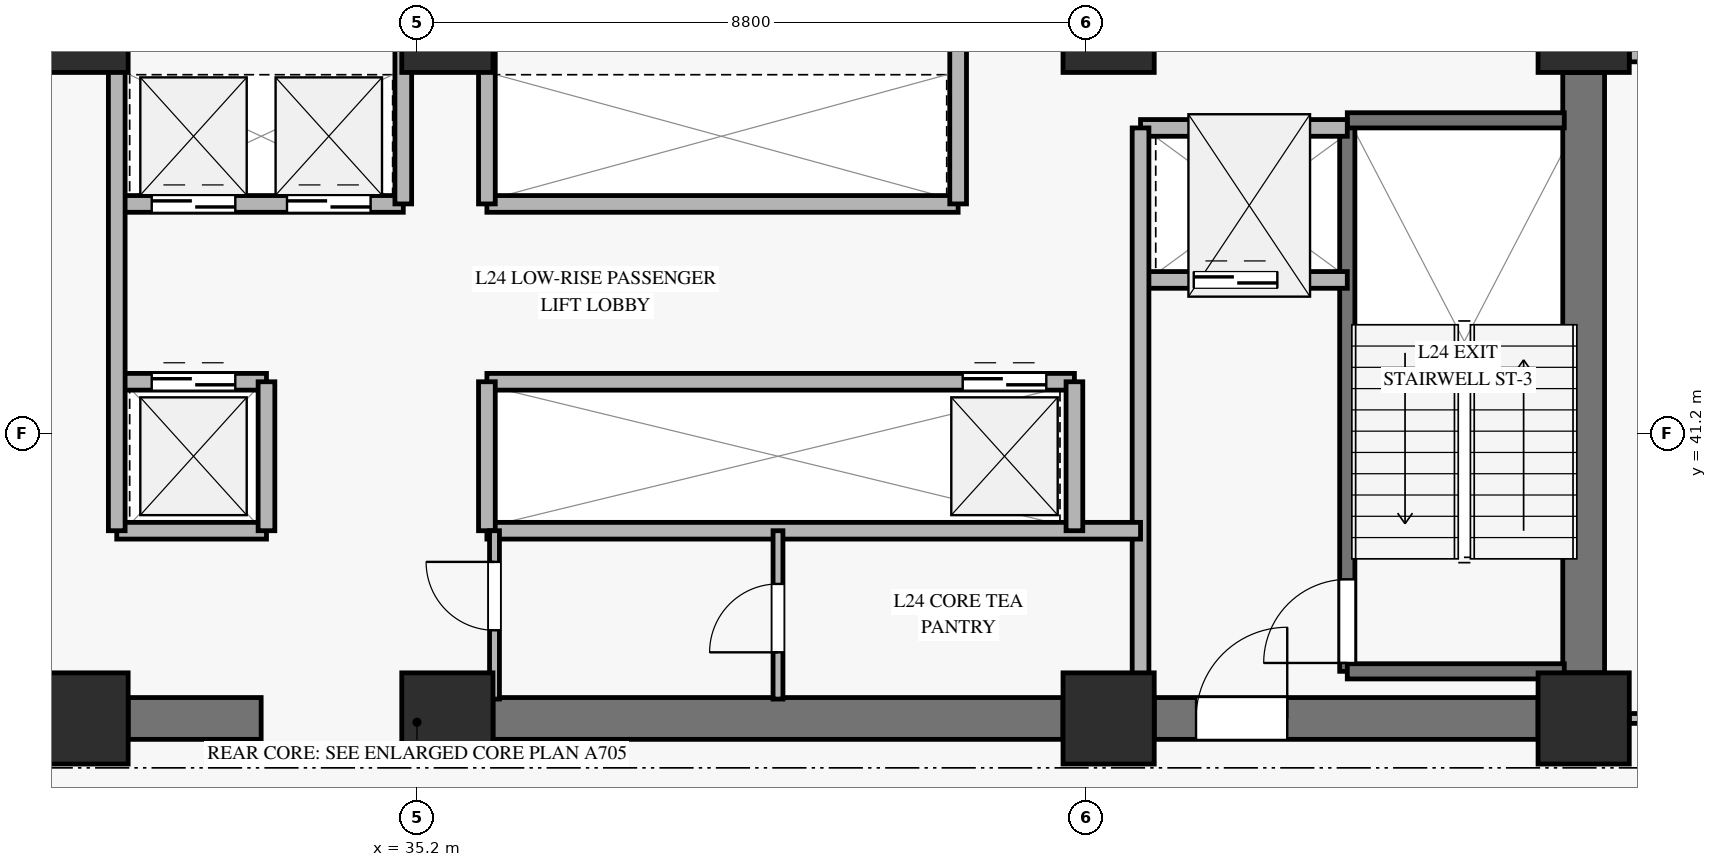
"""IFC4 building model, lengths in metres.
Left out: names, types, materials, properties, quantities, classifications, styles, units other than length and angle.
Written with IfcOpenShell. Run it as: python <this file> out.ifc"""

import sys

from ifc_helpers import new_model, si_unit, direction, frame, frame_2d, origin, origin_2d, place, context, subcontext, project, spatial, rectangle, extrude, source, transform, mapped, element, fill, save


model = new_model("IFC4")
c1 = context("Model", 3, precision=1e-05, world=origin(), true_north=direction((0.0, 1.0)))
c2 = subcontext(c1, "Body", "Model", "MODEL_VIEW")
j1 = project(units=[si_unit("LENGTHUNIT", "METRE"), si_unit("PLANEANGLEUNIT", "RADIAN")], contexts=[c1])
p1 = place(None, origin())
s1 = spatial("IfcSite", under=j1, at=p1, CompositionType="ELEMENT")
p2 = place(p1, origin())
s2 = spatial("IfcBuilding", under=s1, at=p2, CompositionType="ELEMENT")
p3 = place(p2, frame((0.0, 0.0, 99.7)))
s3 = spatial("IfcBuildingStorey", under=s2, at=p3, CompositionType="ELEMENT", Elevation=99.7)
m1 = source(origin(), c2, "Body", "SweptSolid", [
    extrude(rectangle(XDim=1.2, YDim=1.2, at=origin_2d()), origin(), (0.0, 0.0, 1.0), 3.68),
])
for number, where, z_axis, x_axis in (
    (1, (30.8, 37.45, 0.0), (0.0, 0.0, 1.0), (1.0, 0.0, 0.0)),
    (2, (30.8, 46.55, 0.0), (0.0, 0.0, 1.0), (1.0, 0.0, 0.0)),
    (3, (35.6, 37.45, 0.0), (0.0, 0.0, 1.0), (1.0, 0.0, 0.0)),
    (4, (35.6, 46.55, 0.0), (0.0, 0.0, 1.0), (1.0, 0.0, 0.0)),
    (5, (44.3, 37.45, 0.0), (0.0, 0.0, 1.0), (1.0, 0.0, 0.0)),
    (6, (44.3, 46.55, 0.0), (0.0, 0.0, 1.0), (1.0, 0.0, 0.0)),
    (7, (50.55, 37.45, 0.0), (0.0, 0.0, 1.0), (1.0, 0.0, 0.0)),
    (8, (50.55, 46.55, 0.0), (0.0, 0.0, 1.0), (1.0, 0.0, 0.0)),
):
    element("IfcColumn", number, at=place(p3, frame(where, z_axis=z_axis, x_axis=x_axis)), inside=s3, PredefinedType="PILASTER", context=c2, shape_type="MappedRepresentation", body=[
        mapped(m1, transform((0.0, 0.0, 0.0), x_axis=(1.0, 0.0, 0.0), y_axis=(0.0, 1.0, 0.0), z_axis=(0.0, 0.0, 1.0), scale=1.0)),
    ])
p4 = place(p3, frame((31.4, 37.45, 0.0), z_axis=(0.0, 0.0, 1.0), x_axis=(1.0, 0.0, 0.0)))
e9 = element("IfcWall", 9, at=p4, inside=s3, PredefinedType="SHEAR", context=c2, shape_type="SweptSolid", body=[
    extrude(rectangle(XDim=1.75, YDim=0.55, at=frame_2d((0.875, 0.0))), origin(), (0.0, 0.0, 1.0), 3.68),
])
p5 = place(p3, frame((36.2, 37.45, 0.0), z_axis=(0.0, 0.0, 1.0), x_axis=(1.0, 0.0, 0.0)))
e10 = element("IfcWall", 10, at=p5, inside=s3, PredefinedType="SHEAR", context=c2, shape_type="SweptSolid", body=[
    extrude(rectangle(XDim=7.5, YDim=0.55, at=frame_2d((3.75, 0.0))), origin(), (0.0, 0.0, 1.0), 3.68),
])
p6 = place(p3, frame((44.9, 37.45, 0.0), z_axis=(0.0, 0.0, 1.0), x_axis=(1.0, 0.0, 0.0)))
e11 = element("IfcWall", 11, at=p6, inside=s3, PredefinedType="SHEAR", context=c2, shape_type="SweptSolid", body=[
    extrude(rectangle(XDim=5.05, YDim=0.55, at=frame_2d((2.525, 0.0))), origin(), (0.0, 0.0, 1.0), 3.68),
])
p7 = place(p6, frame((0.55, 0.0, 0.0)))
e12 = element("IfcOpeningElement", 12, at=p7, cuts=e11, PredefinedType="OPENING", context=c2, shape_type="SweptSolid", body=[
    extrude(rectangle(XDim=1.2, YDim=2.15, at=frame_2d((0.6, 1.075))), frame((0.0, 0.285, 0.0), z_axis=(0.0, -1.0, 0.0), x_axis=(1.0, 0.0, 0.0)), (0.0, 0.0, 1.0), 0.57),
])
p8 = place(p3, frame((50.55, 38.05, 0.0), z_axis=(0.0, 0.0, 1.0), x_axis=(0.0, 1.0, 0.0)))
e13 = element("IfcWall", 13, at=p8, inside=s3, PredefinedType="SHEAR", context=c2, shape_type="SweptSolid", body=[
    extrude(rectangle(XDim=7.9, YDim=0.55, at=frame_2d((3.95, 0.0))), origin(), (0.0, 0.0, 1.0), 3.68),
])
p9 = place(p3, frame((51.15, 46.25, 0.0), z_axis=(0.0, 0.0, 1.0), x_axis=(1.0, 0.0, 0.0)))
e14 = element("IfcWall", 14, at=p9, inside=s3, PredefinedType="SOLIDWALL", context=c2, shape_type="SweptSolid", body=[
    extrude(rectangle(XDim=11.248, YDim=0.32, at=frame_2d((5.624, 0.0))), origin(), (0.0, 0.0, 1.0), 3.16),
])
p10 = place(p9, frame((4.824, 0.0, 0.45)))
e15 = element("IfcOpeningElement", 15, at=p10, cuts=e14, PredefinedType="OPENING", context=c2, shape_type="SweptSolid", body=[
    extrude(rectangle(XDim=1.6, YDim=2.0, at=frame_2d((0.8, 1.0))), frame((0.0, 0.17, 0.0), z_axis=(0.0, -1.0, 0.0), x_axis=(1.0, 0.0, 0.0)), (0.0, 0.0, 1.0), 0.34),
])
p11 = place(p3, frame((47.44, 38.07, 0.0), z_axis=(0.0, 0.0, 1.0), x_axis=(0.0, 1.0, 0.0)))
e16 = element("IfcWall", 16, at=p11, inside=s3, PredefinedType="SOLIDWALL", context=c2, shape_type="SweptSolid", body=[
    extrude(rectangle(XDim=7.25, YDim=0.2, at=frame_2d((3.625, 0.0))), origin(), (0.0, 0.0, 1.0), 3.9),
])
p12 = place(p11, frame((0.11, 0.0, 0.0)))
e17 = element("IfcOpeningElement", 17, at=p12, cuts=e16, PredefinedType="OPENING", context=c2, shape_type="SweptSolid", body=[
    extrude(rectangle(XDim=1.1, YDim=2.15, at=frame_2d((0.55, 1.075))), frame((0.0, 0.11, 0.0), z_axis=(0.0, -1.0, 0.0), x_axis=(1.0, 0.0, 0.0)), (0.0, 0.0, 1.0), 0.22),
])
for number, where, z_axis, x_axis in (
    (18, (47.44, 45.32, 0.0), (0.0, 0.0, 1.0), (1.0, 0.0, 0.0)),
    (19, (47.44, 38.07, 0.0), (0.0, 0.0, 1.0), (1.0, 0.0, 0.0)),
):
    element("IfcWall", number, at=place(p3, frame(where, z_axis=z_axis, x_axis=x_axis)), inside=s3, PredefinedType="SOLIDWALL", context=c2, shape_type="SweptSolid", body=[
        extrude(rectangle(XDim=2.855, YDim=0.2, at=frame_2d((1.427, 0.0))), origin(), (0.0, 0.0, 1.0), 3.9),
    ])
p13 = place(p3, frame((44.72, 43.22, 0.0), z_axis=(0.0, 0.0, 1.0), x_axis=(1.0, 0.0, 0.0)))
e20 = element("IfcWall", 20, at=p13, inside=s3, PredefinedType="SOLIDWALL", context=c2, shape_type="SweptSolid", body=[
    extrude(rectangle(XDim=2.72, YDim=0.22, at=frame_2d((1.36, 0.0))), origin(), (0.0, 0.0, 1.0), 3.68),
])
p14 = place(p13, frame((0.7, 0.0, 0.0)))
e21 = element("IfcOpeningElement", 21, at=p14, cuts=e20, PredefinedType="OPENING", context=c2, shape_type="SweptSolid", body=[
    extrude(rectangle(XDim=1.1, YDim=2.2, at=frame_2d((0.55, 1.1))), frame((0.0, 0.12, 0.0), z_axis=(0.0, -1.0, 0.0), x_axis=(1.0, 0.0, 0.0)), (0.0, 0.0, 1.0), 0.24),
])
p15 = place(p3, frame((44.72, 45.22, 0.0), z_axis=(0.0, 0.0, 1.0), x_axis=(1.0, 0.0, 0.0)))
e22 = element("IfcWall", 22, at=p15, inside=s3, PredefinedType="SOLIDWALL", context=c2, shape_type="SweptSolid", body=[
    extrude(rectangle(XDim=2.72, YDim=0.22, at=frame_2d((1.36, 0.0))), origin(), (0.0, 0.0, 1.0), 3.68),
])
p16 = place(p3, frame((44.72, 37.705, 0.0), z_axis=(0.0, 0.0, 1.0), x_axis=(0.0, 1.0, 0.0)))
e23 = element("IfcWall", 23, at=p16, inside=s3, PredefinedType="SOLIDWALL", context=c2, shape_type="SweptSolid", body=[
    extrude(rectangle(XDim=7.515, YDim=0.22, at=frame_2d((3.757, 0.0))), origin(), (0.0, 0.0, 1.0), 3.68),
])
p17 = place(p3, frame((31.25, 44.22, 0.0), z_axis=(0.0, 0.0, 1.0), x_axis=(1.0, 0.0, 0.0)))
e24 = element("IfcWall", 24, at=p17, inside=s3, PredefinedType="SOLIDWALL", context=c2, shape_type="SweptSolid", body=[
    extrude(rectangle(XDim=3.77, YDim=0.22, at=frame_2d((1.885, 0.0))), origin(), (0.0, 0.0, 1.0), 3.68),
])
p18 = place(p17, frame((0.46, 0.0, 0.0)))
e25 = element("IfcOpeningElement", 25, at=p18, cuts=e24, PredefinedType="OPENING", context=c2, shape_type="SweptSolid", body=[
    extrude(rectangle(XDim=1.1, YDim=2.2, at=frame_2d((0.55, 1.1))), frame((0.0, 0.12, 0.0), z_axis=(0.0, -1.0, 0.0), x_axis=(1.0, 0.0, 0.0)), (0.0, 0.0, 1.0), 0.24),
])
p19 = place(p17, frame((2.24, 0.0, 0.0)))
e26 = element("IfcOpeningElement", 26, at=p19, cuts=e24, PredefinedType="OPENING", context=c2, shape_type="SweptSolid", body=[
    extrude(rectangle(XDim=1.1, YDim=2.2, at=frame_2d((0.55, 1.1))), frame((0.0, 0.12, 0.0), z_axis=(0.0, -1.0, 0.0), x_axis=(1.0, 0.0, 0.0)), (0.0, 0.0, 1.0), 0.24),
])
p20 = place(p3, frame((36.12, 44.22, 0.0), z_axis=(0.0, 0.0, 1.0), x_axis=(1.0, 0.0, 0.0)))
e27 = element("IfcWall", 27, at=p20, inside=s3, PredefinedType="SOLIDWALL", context=c2, shape_type="SweptSolid", body=[
    extrude(rectangle(XDim=6.2, YDim=0.22, at=frame_2d((3.1, 0.0))), origin(), (0.0, 0.0, 1.0), 3.68),
])
for number, where, z_axis, x_axis in (
    (28, (35.02, 44.22, 0.0), (0.0, 0.0, 1.0), (0.0, 1.0, 0.0)),
    (29, (36.12, 44.22, 0.0), (0.0, 0.0, 1.0), (0.0, 1.0, 0.0)),
    (30, (42.32, 44.22, 0.0), (0.0, 0.0, 1.0), (0.0, 1.0, 0.0)),
):
    element("IfcWall", number, at=place(p3, frame(where, z_axis=z_axis, x_axis=x_axis)), inside=s3, PredefinedType="SOLIDWALL", context=c2, shape_type="SweptSolid", body=[
        extrude(rectangle(XDim=2.075, YDim=0.22, at=frame_2d((1.038, 0.0))), origin(), (0.0, 0.0, 1.0), 3.68),
    ])
p21 = place(p3, frame((31.25, 41.88, 0.0), z_axis=(0.0, 0.0, 1.0), x_axis=(1.0, 0.0, 0.0)))
e31 = element("IfcWall", 31, at=p21, inside=s3, PredefinedType="SOLIDWALL", context=c2, shape_type="SweptSolid", body=[
    extrude(rectangle(XDim=1.97, YDim=0.22, at=frame_2d((0.985, 0.0))), origin(), (0.0, 0.0, 1.0), 3.68),
])
p22 = place(p21, frame((0.46, 0.0, 0.0)))
e32 = element("IfcOpeningElement", 32, at=p22, cuts=e31, PredefinedType="OPENING", context=c2, shape_type="SweptSolid", body=[
    extrude(rectangle(XDim=1.1, YDim=2.2, at=frame_2d((0.55, 1.1))), frame((0.0, 0.12, 0.0), z_axis=(0.0, -1.0, 0.0), x_axis=(1.0, 0.0, 0.0)), (0.0, 0.0, 1.0), 0.24),
])
p23 = place(p3, frame((36.12, 41.88, 0.0), z_axis=(0.0, 0.0, 1.0), x_axis=(1.0, 0.0, 0.0)))
e33 = element("IfcWall", 33, at=p23, inside=s3, PredefinedType="SOLIDWALL", context=c2, shape_type="SweptSolid", body=[
    extrude(rectangle(XDim=7.73, YDim=0.22, at=frame_2d((3.865, 0.0))), origin(), (0.0, 0.0, 1.0), 3.68),
])
p24 = place(p23, frame((6.26, 0.0, 0.0)))
e34 = element("IfcOpeningElement", 34, at=p24, cuts=e33, PredefinedType="OPENING", context=c2, shape_type="SweptSolid", body=[
    extrude(rectangle(XDim=1.1, YDim=2.2, at=frame_2d((0.55, 1.1))), frame((0.0, 0.12, 0.0), z_axis=(0.0, -1.0, 0.0), x_axis=(1.0, 0.0, 0.0)), (0.0, 0.0, 1.0), 0.24),
])
p25 = place(p3, frame((31.25, 39.92, 0.0), z_axis=(0.0, 0.0, 1.0), x_axis=(1.0, 0.0, 0.0)))
e35 = element("IfcWall", 35, at=p25, inside=s3, PredefinedType="SOLIDWALL", context=c2, shape_type="SweptSolid", body=[
    extrude(rectangle(XDim=1.97, YDim=0.22, at=frame_2d((0.985, 0.0))), origin(), (0.0, 0.0, 1.0), 3.68),
])
p26 = place(p3, frame((33.22, 39.92, 0.0), z_axis=(0.0, 0.0, 1.0), x_axis=(0.0, 1.0, 0.0)))
e36 = element("IfcWall", 36, at=p26, inside=s3, PredefinedType="SOLIDWALL", context=c2, shape_type="SweptSolid", body=[
    extrude(rectangle(XDim=1.96, YDim=0.22, at=frame_2d((0.98, 0.0))), origin(), (0.0, 0.0, 1.0), 3.68),
])
p27 = place(p3, frame((36.12, 39.92, 0.0), z_axis=(0.0, 0.0, 1.0), x_axis=(1.0, 0.0, 0.0)))
e37 = element("IfcWall", 37, at=p27, inside=s3, PredefinedType="SOLIDWALL", context=c2, shape_type="SweptSolid", body=[
    extrude(rectangle(XDim=8.6, YDim=0.22, at=frame_2d((4.3, 0.0))), origin(), (0.0, 0.0, 1.0), 2.965),
])
p28 = place(p3, frame((36.12, 39.92, 0.0), z_axis=(0.0, 0.0, 1.0), x_axis=(0.0, 1.0, 0.0)))
e38 = element("IfcWall", 38, at=p28, inside=s3, PredefinedType="SOLIDWALL", context=c2, shape_type="SweptSolid", body=[
    extrude(rectangle(XDim=1.96, YDim=0.22, at=frame_2d((0.98, 0.0))), origin(), (0.0, 0.0, 1.0), 3.68),
])
p29 = place(p3, frame((31.25, 39.92, 0.0), z_axis=(0.0, 0.0, 1.0), x_axis=(0.0, 1.0, 0.0)))
e39 = element("IfcWall", 39, at=p29, inside=s3, PredefinedType="SOLIDWALL", context=c2, shape_type="SweptSolid", body=[
    extrude(rectangle(XDim=6.375, YDim=0.22, at=frame_2d((3.188, 0.0))), origin(), (0.0, 0.0, 1.0), 3.68),
])
p30 = place(p3, frame((43.85, 39.92, 0.0), z_axis=(0.0, 0.0, 1.0), x_axis=(0.0, 1.0, 0.0)))
e40 = element("IfcWall", 40, at=p30, inside=s3, PredefinedType="SOLIDWALL", context=c2, shape_type="SweptSolid", body=[
    extrude(rectangle(XDim=1.96, YDim=0.22, at=frame_2d((0.98, 0.0))), origin(), (0.0, 0.0, 1.0), 3.68),
])
p31 = place(p3, frame((36.22, 37.705, 0.0), z_axis=(0.0, 0.0, 1.0), x_axis=(0.0, 1.0, 0.0)))
e41 = element("IfcWall", 41, at=p31, inside=s3, PredefinedType="PARTITIONING", context=c2, shape_type="SweptSolid", body=[
    extrude(rectangle(XDim=2.215, YDim=0.13, at=frame_2d((1.107, 0.0))), origin(), (0.0, 0.0, 1.0), 3.68),
])
p32 = place(p31, frame((0.905, 0.0, 0.0)))
e42 = element("IfcOpeningElement", 42, at=p32, cuts=e41, PredefinedType="OPENING", context=c2, shape_type="SweptSolid", body=[
    extrude(rectangle(XDim=0.9, YDim=2.1, at=frame_2d((0.45, 1.05))), frame((0.0, 0.075, 0.0), z_axis=(0.0, -1.0, 0.0), x_axis=(1.0, 0.0, 0.0)), (0.0, 0.0, 1.0), 0.15),
])
p33 = place(p3, frame((39.95, 37.705, 0.0), z_axis=(0.0, 0.0, 1.0), x_axis=(0.0, 1.0, 0.0)))
e43 = element("IfcWall", 43, at=p33, inside=s3, PredefinedType="PARTITIONING", context=c2, shape_type="SweptSolid", body=[
    extrude(rectangle(XDim=2.215, YDim=0.13, at=frame_2d((1.107, 0.0))), origin(), (0.0, 0.0, 1.0), 3.68),
])
p34 = place(p33, frame((0.615, 0.0, 0.0)))
e44 = element("IfcOpeningElement", 44, at=p34, cuts=e43, PredefinedType="OPENING", context=c2, shape_type="SweptSolid", body=[
    extrude(rectangle(XDim=0.9, YDim=2.1, at=frame_2d((0.45, 1.05))), frame((0.0, 0.075, 0.0), z_axis=(0.0, -1.0, 0.0), x_axis=(1.0, 0.0, 0.0)), (0.0, 0.0, 1.0), 0.15),
])
p35 = place(p3, frame((51.15, 37.45, 0.0), z_axis=(0.0, 0.0, 1.0), x_axis=(1.0, 0.0, 0.0)))
e45 = element("IfcWall", 45, at=p35, inside=s3, PredefinedType="PARTITIONING", context=c2, shape_type="SweptSolid", body=[
    extrude(rectangle(XDim=14.741, YDim=0.13, at=frame_2d((7.371, 0.0))), origin(), (0.0, 0.0, 1.0), 3.165),
])
p36 = place(p35, frame((0.5, 0.0, 0.0)))
e46 = element("IfcOpeningElement", 46, at=p36, cuts=e45, PredefinedType="OPENING", context=c2, shape_type="SweptSolid", body=[
    extrude(rectangle(XDim=0.9, YDim=2.1, at=frame_2d((0.45, 1.05))), frame((0.0, 0.075, 0.0), z_axis=(0.0, -1.0, 0.0), x_axis=(1.0, 0.0, 0.0)), (0.0, 0.0, 1.0), 0.15),
])
p37 = place(p35, frame((10.759, 0.0, 0.0)))
e47 = element("IfcOpeningElement", 47, at=p37, cuts=e45, PredefinedType="OPENING", context=c2, shape_type="SweptSolid", body=[
    extrude(rectangle(XDim=0.95, YDim=2.1, at=frame_2d((0.475, 1.05))), frame((0.0, 0.075, 0.0), z_axis=(0.0, -1.0, 0.0), x_axis=(1.0, 0.0, 0.0)), (0.0, 0.0, 1.0), 0.15),
])
m2 = source(origin(), c2, "Body", "SweptSolid", [
    extrude(rectangle(XDim=1.1, YDim=2.15, at=frame_2d((0.55, 1.075))), frame((0.0, 0.025, 0.0), z_axis=(0.0, -1.0, 0.0), x_axis=(1.0, 0.0, 0.0)), (0.0, 0.0, 1.0), 0.05),
])
p38 = place(p12, origin())
e48 = element("IfcDoor", 48, at=p38, inside=s3, OperationType="SINGLE_SWING_LEFT", PredefinedType="DOOR", context=c2, shape_type="MappedRepresentation", body=[
    mapped(m2, transform((0.0, 0.0, 0.0), x_axis=(1.0, 0.0, 0.0), y_axis=(0.0, 1.0, 0.0), z_axis=(0.0, 0.0, 1.0), scale=1.0)),
])
fill(e17, e48)
m3 = source(origin(), c2, "Body", "SweptSolid", [
    extrude(rectangle(XDim=1.1, YDim=2.2, at=frame_2d((0.55, 1.1))), frame((0.0, 0.025, 0.0), z_axis=(0.0, -1.0, 0.0), x_axis=(1.0, 0.0, 0.0)), (0.0, 0.0, 1.0), 0.05),
])
p39 = place(p14, origin())
e49 = element("IfcDoor", 49, at=p39, inside=s3, OperationType="SLIDING_TO_LEFT", PredefinedType="DOOR", context=c2, shape_type="MappedRepresentation", body=[
    mapped(m3, transform((0.0, 0.0, 0.0), x_axis=(1.0, 0.0, 0.0), y_axis=(0.0, 1.0, 0.0), z_axis=(0.0, 0.0, 1.0), scale=1.0)),
])
fill(e21, e49)
m4 = source(origin(), c2, "Body", "SweptSolid", [
    extrude(rectangle(XDim=1.2, YDim=2.15, at=frame_2d((0.6, 1.075))), frame((0.0, 0.025, 0.0), z_axis=(0.0, -1.0, 0.0), x_axis=(1.0, 0.0, 0.0)), (0.0, 0.0, 1.0), 0.05),
])
p40 = place(p7, origin())
e50 = element("IfcDoor", 50, at=p40, inside=s3, OperationType="SINGLE_SWING_RIGHT", PredefinedType="DOOR", context=c2, shape_type="MappedRepresentation", body=[
    mapped(m4, transform((0.0, 0.0, 0.0), x_axis=(1.0, 0.0, 0.0), y_axis=(0.0, 1.0, 0.0), z_axis=(0.0, 0.0, 1.0), scale=1.0)),
])
fill(e12, e50)
p41 = place(p18, origin())
e51 = element("IfcDoor", 51, at=p41, inside=s3, OperationType="SLIDING_TO_LEFT", PredefinedType="DOOR", context=c2, shape_type="MappedRepresentation", body=[
    mapped(m3, transform((0.0, 0.0, 0.0), x_axis=(1.0, 0.0, 0.0), y_axis=(0.0, 1.0, 0.0), z_axis=(0.0, 0.0, 1.0), scale=1.0)),
])
fill(e25, e51)
p42 = place(p19, origin())
e52 = element("IfcDoor", 52, at=p42, inside=s3, OperationType="SLIDING_TO_LEFT", PredefinedType="DOOR", context=c2, shape_type="MappedRepresentation", body=[
    mapped(m3, transform((0.0, 0.0, 0.0), x_axis=(1.0, 0.0, 0.0), y_axis=(0.0, 1.0, 0.0), z_axis=(0.0, 0.0, 1.0), scale=1.0)),
])
fill(e26, e52)
p43 = place(p22, origin())
e53 = element("IfcDoor", 53, at=p43, inside=s3, OperationType="SLIDING_TO_LEFT", PredefinedType="DOOR", context=c2, shape_type="MappedRepresentation", body=[
    mapped(m3, transform((0.0, 0.0, 0.0), x_axis=(1.0, 0.0, 0.0), y_axis=(0.0, 1.0, 0.0), z_axis=(0.0, 0.0, 1.0), scale=1.0)),
])
fill(e32, e53)
p44 = place(p24, origin())
e54 = element("IfcDoor", 54, at=p44, inside=s3, OperationType="SLIDING_TO_LEFT", PredefinedType="DOOR", context=c2, shape_type="MappedRepresentation", body=[
    mapped(m3, transform((0.0, 0.0, 0.0), x_axis=(1.0, 0.0, 0.0), y_axis=(0.0, 1.0, 0.0), z_axis=(0.0, 0.0, 1.0), scale=1.0)),
])
fill(e34, e54)
m5 = source(origin(), c2, "Body", "SweptSolid", [
    extrude(rectangle(XDim=0.9, YDim=2.1, at=frame_2d((0.45, 1.05))), frame((0.0, 0.025, 0.0), z_axis=(0.0, -1.0, 0.0), x_axis=(1.0, 0.0, 0.0)), (0.0, 0.0, 1.0), 0.05),
])
p45 = place(p32, origin())
e55 = element("IfcDoor", 55, at=p45, inside=s3, OperationType="SINGLE_SWING_RIGHT", PredefinedType="DOOR", context=c2, shape_type="MappedRepresentation", body=[
    mapped(m5, transform((0.0, 0.0, 0.0), x_axis=(1.0, 0.0, 0.0), y_axis=(0.0, 1.0, 0.0), z_axis=(0.0, 0.0, 1.0), scale=1.0)),
])
fill(e42, e55)
p46 = place(p34, origin())
e56 = element("IfcDoor", 56, at=p46, inside=s3, OperationType="SINGLE_SWING_LEFT", PredefinedType="DOOR", context=c2, shape_type="MappedRepresentation", body=[
    mapped(m5, transform((0.0, 0.0, 0.0), x_axis=(1.0, 0.0, 0.0), y_axis=(0.0, 1.0, 0.0), z_axis=(0.0, 0.0, 1.0), scale=1.0)),
])
fill(e44, e56)
save(model, sys.argv[1])
